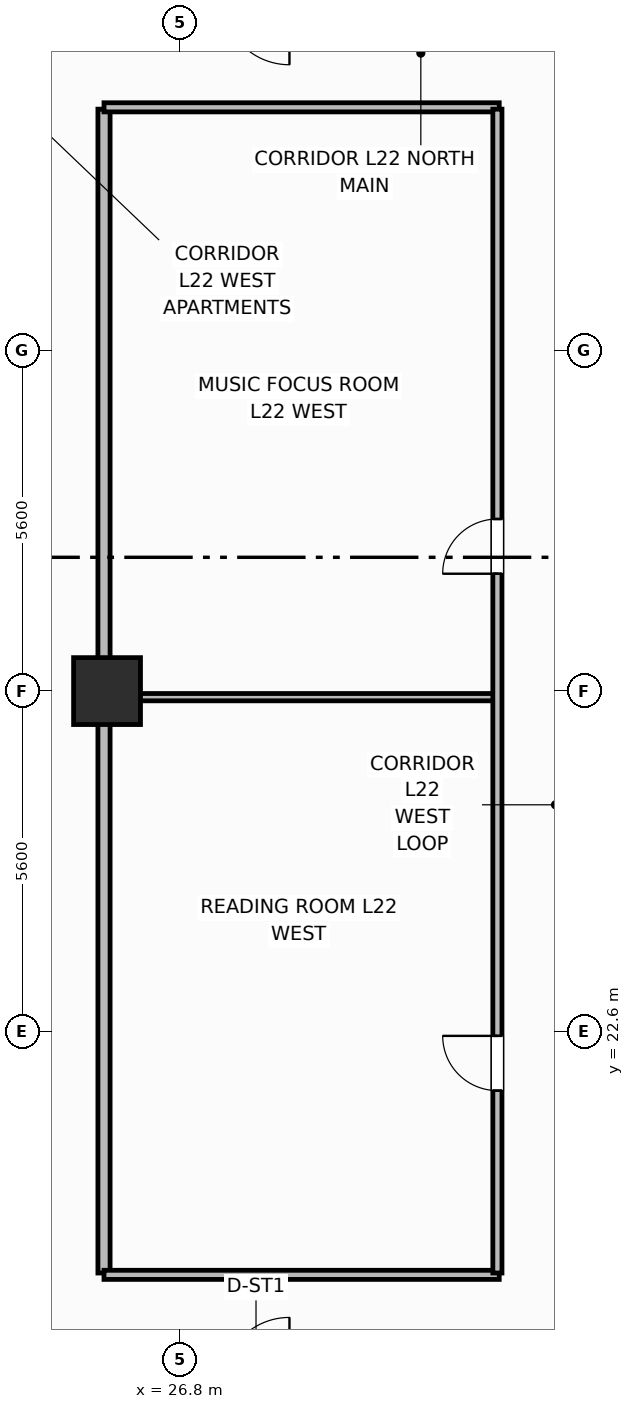
"""IFC4 building model, lengths in metres.
Left out: names, types, materials, properties, quantities, classifications, styles, units other than length and angle.
Written with IfcOpenShell. Run it as: python <this file> out.ifc"""

import sys

from ifc_helpers import new_model, si_unit, direction, frame, frame_2d, origin, origin_2d, place, context, subcontext, project, spatial, rectangle, extrude, element, fill, save


model = new_model("IFC4")
c1 = context("Model", 3, precision=1e-05, world=origin(), true_north=direction((0.0, 1.0)))
c2 = subcontext(c1, "Body", "Model", "MODEL_VIEW")
j1 = project(units=[si_unit("LENGTHUNIT", "METRE"), si_unit("PLANEANGLEUNIT", "RADIAN")], contexts=[c1])
p1 = place(None, origin())
s1 = spatial("IfcSite", under=j1, at=p1, CompositionType="ELEMENT")
p2 = place(p1, origin())
s2 = spatial("IfcBuilding", under=s1, at=p2, CompositionType="ELEMENT")
p3 = place(p2, frame((0.0, 0.0, 92.0)))
s3 = spatial("IfcBuildingStorey", under=s2, at=p3, CompositionType="ELEMENT", Elevation=92.0)
p4 = place(p3, frame((25.6, 28.2, 0.0), z_axis=(0.0, 0.0, 1.0), x_axis=(1.0, 0.0, 0.0)))
e1 = element("IfcColumn", 1, at=p4, inside=s3, PredefinedType="COLUMN", context=c2, shape_type="SweptSolid", body=[
    extrude(rectangle(XDim=1.1, YDim=1.1, at=origin_2d()), origin(), (0.0, 0.0, 1.0), 3.7),
])
p5 = place(p3, frame((25.55, 18.63, 0.0), z_axis=(0.0, 0.0, 1.0), x_axis=(0.0, 1.0, 0.0)))
e2 = element("IfcWall", 2, at=p5, inside=s3, PredefinedType="PARTITIONING", context=c2, shape_type="SweptSolid", body=[
    extrude(rectangle(XDim=19.14, YDim=0.2, at=frame_2d((9.57, 0.0))), origin(), (0.0, 0.0, 1.0), 2.53),
])
for number, where, z_axis, x_axis in (
    (3, (25.55, 18.6, 0.0), (0.0, 0.0, 1.0), (1.0, 0.0, 0.0)),
    (4, (25.55, 37.8, 0.0), (0.0, 0.0, 1.0), (1.0, 0.0, 0.0)),
):
    element("IfcWall", number, at=place(p3, frame(where, z_axis=z_axis, x_axis=x_axis)), inside=s3, PredefinedType="PARTITIONING", context=c2, shape_type="SweptSolid", body=[
        extrude(rectangle(XDim=6.5, YDim=0.15, at=frame_2d((3.25, 0.0))), origin(), (0.0, 0.0, 1.0), 2.53),
    ])
p6 = place(p3, frame((25.6, 28.1, 0.0), z_axis=(0.0, 0.0, 1.0), x_axis=(1.0, 0.0, 0.0)))
e5 = element("IfcWall", 5, at=p6, inside=s3, PredefinedType="PARTITIONING", context=c2, shape_type="SweptSolid", body=[
    extrude(rectangle(XDim=6.42, YDim=0.12, at=frame_2d((3.21, 0.0))), origin(), (0.0, 0.0, 1.0), 2.53),
])
p7 = place(p3, frame((32.02, 18.63, 0.0), z_axis=(0.0, 0.0, 1.0), x_axis=(0.0, 1.0, 0.0)))
e6 = element("IfcWall", 6, at=p7, inside=s3, PredefinedType="PARTITIONING", context=c2, shape_type="SweptSolid", body=[
    extrude(rectangle(XDim=19.14, YDim=0.15, at=frame_2d((9.57, 0.0))), origin(), (0.0, 0.0, 1.0), 2.53),
])
p8 = place(p7, frame((3.0, 0.0, 0.0)))
e7 = element("IfcOpeningElement", 7, at=p8, cuts=e6, PredefinedType="OPENING", context=c2, shape_type="SweptSolid", body=[
    extrude(rectangle(XDim=0.9, YDim=2.1, at=frame_2d((0.45, 1.05))), frame((0.0, 0.085, 0.0), z_axis=(0.0, -1.0, 0.0), x_axis=(1.0, 0.0, 0.0)), (0.0, 0.0, 1.0), 0.17),
])
p9 = place(p7, frame((11.5, 0.0, 0.0)))
e8 = element("IfcOpeningElement", 8, at=p9, cuts=e6, PredefinedType="OPENING", context=c2, shape_type="SweptSolid", body=[
    extrude(rectangle(XDim=0.9, YDim=2.1, at=frame_2d((0.45, 1.05))), frame((0.0, 0.085, 0.0), z_axis=(0.0, -1.0, 0.0), x_axis=(1.0, 0.0, 0.0)), (0.0, 0.0, 1.0), 0.17),
])
p10 = place(p8, origin())
e9 = element("IfcDoor", 9, at=p10, inside=s3, OperationType="SINGLE_SWING_RIGHT", PredefinedType="DOOR", context=c2, shape_type="SweptSolid", body=[
    extrude(rectangle(XDim=0.9, YDim=2.1, at=frame_2d((0.45, 1.05))), frame((0.0, 0.025, 0.0), z_axis=(0.0, -1.0, 0.0), x_axis=(1.0, 0.0, 0.0)), (0.0, 0.0, 1.0), 0.05),
])
fill(e7, e9)
p11 = place(p9, origin())
e10 = element("IfcDoor", 10, at=p11, inside=s3, OperationType="SINGLE_SWING_LEFT", PredefinedType="DOOR", context=c2, shape_type="SweptSolid", body=[
    extrude(rectangle(XDim=0.9, YDim=2.1, at=frame_2d((0.45, 1.05))), frame((0.0, 0.025, 0.0), z_axis=(0.0, -1.0, 0.0), x_axis=(1.0, 0.0, 0.0)), (0.0, 0.0, 1.0), 0.05),
])
fill(e8, e10)
save(model, sys.argv[1])
